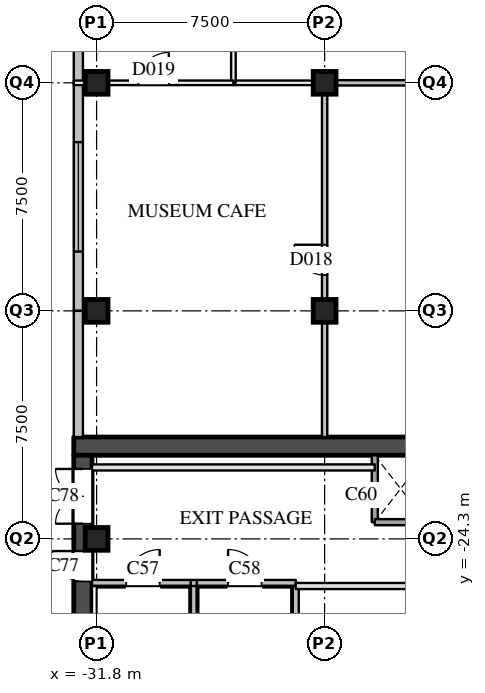
"""IFC4 building model, lengths in metres.
Left out: names, types, materials, properties, quantities, classifications, styles, units other than length and angle.
Written with IfcOpenShell. Run it as: python <this file> out.ifc"""

import sys

from ifc_helpers import new_model, si_unit, direction, frame, frame_2d, origin, origin_2d, place, context, subcontext, project, spatial, rectangle, extrude, element, fill, save


model = new_model("IFC4")
c1 = context("Model", 3, precision=1e-05, world=origin(), true_north=direction((0.0, 1.0)))
c2 = subcontext(c1, "Body", "Model", "MODEL_VIEW")
j1 = project(units=[si_unit("LENGTHUNIT", "METRE"), si_unit("PLANEANGLEUNIT", "RADIAN")], contexts=[c1])
p1 = place(None, origin())
s1 = spatial("IfcSite", under=j1, at=p1, CompositionType="ELEMENT")
p2 = place(p1, origin())
s2 = spatial("IfcBuilding", under=s1, at=p2, CompositionType="ELEMENT")
p3 = place(p2, origin())
s3 = spatial("IfcBuildingStorey", under=s2, at=p3, CompositionType="ELEMENT", Elevation=0.0)
for number, where, z_axis, x_axis in (
    (1, (-31.8, -24.3, 0.0), (0.0, 0.0, 1.0), (1.0, 0.0, 0.0)),
    (2, (-31.8, -16.8, 0.0), (0.0, 0.0, 1.0), (1.0, 0.0, 0.0)),
    (3, (-31.8, -9.3, 0.0), (0.0, 0.0, 1.0), (1.0, 0.0, 0.0)),
    (4, (-24.3, -16.8, 0.0), (0.0, 0.0, 1.0), (1.0, 0.0, 0.0)),
    (5, (-24.3, -9.3, 0.0), (0.0, 0.0, 1.0), (1.0, 0.0, 0.0)),
):
    element("IfcColumn", number, at=place(p3, frame(where, z_axis=z_axis, x_axis=x_axis)), inside=s3, PredefinedType="COLUMN", context=c2, shape_type="SweptSolid", body=[
        extrude(rectangle(XDim=0.75, YDim=0.75, at=origin_2d()), origin(), (0.0, 0.0, 1.0), 8.0),
    ])
p4 = place(p3, frame((-32.4, -1.8, 0.0), z_axis=(0.0, 0.0, 1.0), x_axis=(0.0, -1.0, 0.0)))
e6 = element("IfcWall", 6, at=p4, inside=s3, PredefinedType="SOLIDWALL", context=c2, shape_type="SweptSolid", body=[
    extrude(rectangle(XDim=7.5, YDim=0.3, at=frame_2d((3.75, 0.0))), origin(), (0.0, 0.0, 1.0), 7.59),
])
p5 = place(p4, frame((1.95, 0.0, 0.9)))
e7 = element("IfcOpeningElement", 7, at=p5, cuts=e6, PredefinedType="OPENING", context=c2, shape_type="SweptSolid", body=[
    extrude(rectangle(XDim=3.6, YDim=3.0, at=frame_2d((1.8, 1.5))), frame((0.0, 0.16, 0.0), z_axis=(0.0, -1.0, 0.0), x_axis=(1.0, 0.0, 0.0)), (0.0, 0.0, 1.0), 0.32),
])
p6 = place(p3, frame((-32.4, -9.3, 0.0), z_axis=(0.0, 0.0, 1.0), x_axis=(0.0, -1.0, 0.0)))
e8 = element("IfcWall", 8, at=p6, inside=s3, PredefinedType="SOLIDWALL", context=c2, shape_type="SweptSolid", body=[
    extrude(rectangle(XDim=7.5, YDim=0.3, at=frame_2d((3.75, 0.0))), origin(), (0.0, 0.0, 1.0), 7.59),
])
p7 = place(p6, frame((1.95, 0.0, 0.9)))
e9 = element("IfcOpeningElement", 9, at=p7, cuts=e8, PredefinedType="OPENING", context=c2, shape_type="SweptSolid", body=[
    extrude(rectangle(XDim=3.6, YDim=3.0, at=frame_2d((1.8, 1.5))), frame((0.0, 0.16, 0.0), z_axis=(0.0, -1.0, 0.0), x_axis=(1.0, 0.0, 0.0)), (0.0, 0.0, 1.0), 0.32),
])
p8 = place(p3, frame((-32.4, -16.8, 0.0), z_axis=(0.0, 0.0, 1.0), x_axis=(0.0, -1.0, 0.0)))
e10 = element("IfcWall", 10, at=p8, inside=s3, PredefinedType="SOLIDWALL", context=c2, shape_type="SweptSolid", body=[
    extrude(rectangle(XDim=4.15, YDim=0.3, at=frame_2d((2.075, 0.0))), origin(), (0.0, 0.0, 1.0), 7.59),
])
p9 = place(p3, frame((-32.55, -21.25, 0.0), z_axis=(0.0, 0.0, 1.0), x_axis=(1.0, 0.0, 0.0)))
e11 = element("IfcWall", 11, at=p9, inside=s3, PredefinedType="SHEAR", context=c2, shape_type="SweptSolid", body=[
    extrude(rectangle(XDim=12.2, YDim=0.6, at=frame_2d((6.1, 0.0))), origin(), (0.0, 0.0, 1.0), 7.59),
])
p10 = place(p3, frame((-32.25, -31.95, 0.0), z_axis=(0.0, 0.0, 1.0), x_axis=(0.0, 1.0, 0.0)))
e12 = element("IfcWall", 12, at=p10, inside=s3, PredefinedType="SHEAR", context=c2, shape_type="SweptSolid", body=[
    extrude(rectangle(XDim=10.4, YDim=0.6, at=frame_2d((5.2, 0.0))), origin(), (0.0, 0.0, 1.0), 7.59),
])
p11 = place(p10, frame((6.25, 0.0, 0.0)))
e13 = element("IfcOpeningElement", 13, at=p11, cuts=e12, PredefinedType="OPENING", context=c2, shape_type="SweptSolid", body=[
    extrude(rectangle(XDim=1.0, YDim=2.1, at=frame_2d((0.5, 1.05))), frame((0.0, 0.31, 0.0), z_axis=(0.0, -1.0, 0.0), x_axis=(1.0, 0.0, 0.0)), (0.0, 0.0, 1.0), 0.62),
])
p12 = place(p10, frame((8.15, 0.0, 0.0)))
e14 = element("IfcOpeningElement", 14, at=p12, cuts=e12, PredefinedType="OPENING", context=c2, shape_type="SweptSolid", body=[
    extrude(rectangle(XDim=1.8, YDim=2.4, at=frame_2d((0.9, 1.2))), frame((0.0, 0.31, 0.0), z_axis=(0.0, -1.0, 0.0), x_axis=(1.0, 0.0, 0.0)), (0.0, 0.0, 1.0), 0.62),
])
for number, where, z_axis, x_axis in (
    (15, (-28.6, -27.35, 0.0), (0.0, 0.0, 1.0), (0.0, 1.0, 0.0)),
    (16, (-25.25, -27.35, 0.0), (0.0, 0.0, 1.0), (0.0, 1.0, 0.0)),
):
    element("IfcWall", number, at=place(p3, frame(where, z_axis=z_axis, x_axis=x_axis)), inside=s3, PredefinedType="SOLIDWALL", context=c2, shape_type="SweptSolid", body=[
        extrude(rectangle(XDim=1.6, YDim=0.2, at=frame_2d((0.8, 0.0))), origin(), (0.0, 0.0, 1.0), 7.59),
    ])
p13 = place(p3, frame((-22.65, -23.75, 0.0), z_axis=(0.0, 0.0, 1.0), x_axis=(0.0, 1.0, 0.0)))
e17 = element("IfcWall", 17, at=p13, inside=s3, PredefinedType="SOLIDWALL", context=c2, shape_type="SweptSolid", body=[
    extrude(rectangle(XDim=2.2, YDim=0.2, at=frame_2d((1.1, 0.0))), origin(), (0.0, 0.0, 1.0), 7.59),
])
p14 = place(p13, frame((0.55, 0.0, 0.0)))
e18 = element("IfcOpeningElement", 18, at=p14, cuts=e17, PredefinedType="OPENING", context=c2, shape_type="SweptSolid", body=[
    extrude(rectangle(XDim=0.7, YDim=2.1, at=frame_2d((0.35, 1.05))), frame((0.0, 0.11, 0.0), z_axis=(0.0, -1.0, 0.0), x_axis=(1.0, 0.0, 0.0)), (0.0, 0.0, 1.0), 0.22),
])
p15 = place(p3, frame((-25.25, -25.85, 0.0), z_axis=(0.0, 0.0, 1.0), x_axis=(1.0, 0.0, 0.0)))
e19 = element("IfcWall", 19, at=p15, inside=s3, PredefinedType="PARTITIONING", context=c2, shape_type="SweptSolid", body=[
    extrude(rectangle(XDim=4.3, YDim=0.2, at=frame_2d((2.15, 0.0))), origin(), (0.0, 0.0, 1.0), 7.59),
])
p16 = place(p3, frame((-31.95, -25.75, 0.0), z_axis=(0.0, 0.0, 1.0), x_axis=(1.0, 0.0, 0.0)))
e20 = element("IfcWall", 20, at=p16, inside=s3, PredefinedType="SOLIDWALL", context=c2, shape_type="SweptSolid", body=[
    extrude(rectangle(XDim=3.25, YDim=0.2, at=frame_2d((1.625, 0.0))), origin(), (0.0, 0.0, 1.0), 7.59),
])
p17 = place(p16, frame((1.125, 0.0, 0.0)))
e21 = element("IfcOpeningElement", 21, at=p17, cuts=e20, PredefinedType="OPENING", context=c2, shape_type="SweptSolid", body=[
    extrude(rectangle(XDim=1.1, YDim=2.1, at=frame_2d((0.55, 1.05))), frame((0.0, 0.11, 0.0), z_axis=(0.0, -1.0, 0.0), x_axis=(1.0, 0.0, 0.0)), (0.0, 0.0, 1.0), 0.22),
])
p18 = place(p3, frame((-28.7, -25.75, 0.0), z_axis=(0.0, 0.0, 1.0), x_axis=(1.0, 0.0, 0.0)))
e22 = element("IfcWall", 22, at=p18, inside=s3, PredefinedType="SOLIDWALL", context=c2, shape_type="SweptSolid", body=[
    extrude(rectangle(XDim=0.2, YDim=0.2, at=frame_2d((0.1, 0.0))), origin(), (0.0, 0.0, 1.0), 7.59),
])
p19 = place(p3, frame((-28.5, -25.75, 0.0), z_axis=(0.0, 0.0, 1.0), x_axis=(1.0, 0.0, 0.0)))
e23 = element("IfcWall", 23, at=p19, inside=s3, PredefinedType="SOLIDWALL", context=c2, shape_type="SweptSolid", body=[
    extrude(rectangle(XDim=3.25, YDim=0.2, at=frame_2d((1.625, 0.0))), origin(), (0.0, 0.0, 1.0), 7.59),
])
p20 = place(p19, frame((1.025, 0.0, 0.0)))
e24 = element("IfcOpeningElement", 24, at=p20, cuts=e23, PredefinedType="OPENING", context=c2, shape_type="SweptSolid", body=[
    extrude(rectangle(XDim=1.1, YDim=2.1, at=frame_2d((0.55, 1.05))), frame((0.0, 0.11, 0.0), z_axis=(0.0, -1.0, 0.0), x_axis=(1.0, 0.0, 0.0)), (0.0, 0.0, 1.0), 0.22),
])
p21 = place(p3, frame((-22.65, -23.75, 0.0), z_axis=(0.0, 0.0, 1.0), x_axis=(1.0, 0.0, 0.0)))
e25 = element("IfcWall", 25, at=p21, inside=s3, PredefinedType="SOLIDWALL", context=c2, shape_type="SweptSolid", body=[
    extrude(rectangle(XDim=1.7, YDim=0.2, at=frame_2d((0.85, 0.0))), origin(), (0.0, 0.0, 1.0), 7.59),
])
p22 = place(p3, frame((-31.95, -21.95, 0.0), z_axis=(0.0, 0.0, 1.0), x_axis=(1.0, 0.0, 0.0)))
e26 = element("IfcWall", 26, at=p22, inside=s3, PredefinedType="PARTITIONING", context=c2, shape_type="SweptSolid", body=[
    extrude(rectangle(XDim=9.3, YDim=0.2, at=frame_2d((4.65, 0.0))), origin(), (0.0, 0.0, 1.0), 7.59),
])
p23 = place(p3, frame((-24.3, -9.3, 0.0), z_axis=(0.0, 0.0, 1.0), x_axis=(1.0, 0.0, 0.0)))
e27 = element("IfcWall", 27, at=p23, inside=s3, PredefinedType="PARTITIONING", context=c2, shape_type="SweptSolid", body=[
    extrude(rectangle(XDim=15.0, YDim=0.175, at=frame_2d((7.5, 0.0))), origin(), (0.0, 0.0, 1.0), 6.79),
])
p24 = place(p23, frame((11.1, 0.0, 0.0)))
e28 = element("IfcOpeningElement", 28, at=p24, cuts=e27, PredefinedType="OPENING", context=c2, shape_type="SweptSolid", body=[
    extrude(rectangle(XDim=1.8, YDim=2.1, at=frame_2d((0.9, 1.05))), frame((0.0, 0.097, 0.0), z_axis=(0.0, -1.0, 0.0), x_axis=(1.0, 0.0, 0.0)), (0.0, 0.0, 1.0), 0.195),
])
p25 = place(p3, frame((-24.3, -20.95, 0.0), z_axis=(0.0, 0.0, 1.0), x_axis=(0.0, 1.0, 0.0)))
e29 = element("IfcWall", 29, at=p25, inside=s3, PredefinedType="PARTITIONING", context=c2, shape_type="SweptSolid", body=[
    extrude(rectangle(XDim=11.65, YDim=0.175, at=frame_2d((5.825, 0.0))), origin(), (0.0, 0.0, 1.0), 6.79),
])
p26 = place(p25, frame((5.325, 0.0, 0.0)))
e30 = element("IfcOpeningElement", 30, at=p26, cuts=e29, PredefinedType="OPENING", context=c2, shape_type="SweptSolid", body=[
    extrude(rectangle(XDim=1.0, YDim=2.1, at=frame_2d((0.5, 1.05))), frame((0.0, 0.097, 0.0), z_axis=(0.0, -1.0, 0.0), x_axis=(1.0, 0.0, 0.0)), (0.0, 0.0, 1.0), 0.195),
])
p27 = place(p3, frame((-27.3, -9.3, 0.0), z_axis=(0.0, 0.0, 1.0), x_axis=(1.0, 0.0, 0.0)))
e31 = element("IfcWall", 31, at=p27, inside=s3, PredefinedType="PARTITIONING", context=c2, shape_type="SweptSolid", body=[
    extrude(rectangle(XDim=3.0, YDim=0.15, at=frame_2d((1.5, 0.0))), origin(), (0.0, 0.0, 1.0), 6.79),
])
p28 = place(p3, frame((-27.3, -9.3, 0.0), z_axis=(0.0, 0.0, 1.0), x_axis=(0.0, 1.0, 0.0)))
e32 = element("IfcWall", 32, at=p28, inside=s3, PredefinedType="PARTITIONING", context=c2, shape_type="SweptSolid", body=[
    extrude(rectangle(XDim=21.3, YDim=0.15, at=frame_2d((10.65, 0.0))), origin(), (0.0, 0.0, 1.0), 6.79),
])
p29 = place(p3, frame((-32.55, -9.3, 0.0), z_axis=(0.0, 0.0, 1.0), x_axis=(1.0, 0.0, 0.0)))
e33 = element("IfcWall", 33, at=p29, inside=s3, PredefinedType="PARTITIONING", context=c2, shape_type="SweptSolid", body=[
    extrude(rectangle(XDim=5.25, YDim=0.15, at=frame_2d((2.625, 0.0))), origin(), (0.0, 0.0, 1.0), 6.79),
])
p30 = place(p29, frame((2.125, 0.0, 0.0)))
e34 = element("IfcOpeningElement", 34, at=p30, cuts=e33, PredefinedType="OPENING", context=c2, shape_type="SweptSolid", body=[
    extrude(rectangle(XDim=1.0, YDim=2.1, at=frame_2d((0.5, 1.05))), frame((0.0, 0.085, 0.0), z_axis=(0.0, -1.0, 0.0), x_axis=(1.0, 0.0, 0.0)), (0.0, 0.0, 1.0), 0.17),
])
p31 = place(p7, origin())
e35 = element("IfcWindow", 35, at=p31, inside=s3, PartitioningType="SINGLE_PANEL", PredefinedType="WINDOW", context=c2, shape_type="SweptSolid", body=[
    extrude(rectangle(XDim=3.6, YDim=3.0, at=frame_2d((1.8, 1.5))), frame((0.0, 0.03, 0.0), z_axis=(0.0, -1.0, 0.0), x_axis=(1.0, 0.0, 0.0)), (0.0, 0.0, 1.0), 0.06),
])
fill(e9, e35)
p32 = place(p17, origin())
e36 = element("IfcDoor", 36, at=p32, inside=s3, OperationType="SINGLE_SWING_RIGHT", PredefinedType="DOOR", context=c2, shape_type="SweptSolid", body=[
    extrude(rectangle(XDim=1.1, YDim=2.1, at=frame_2d((0.55, 1.05))), frame((0.0, 0.025, 0.0), z_axis=(0.0, -1.0, 0.0), x_axis=(1.0, 0.0, 0.0)), (0.0, 0.0, 1.0), 0.05),
])
fill(e21, e36)
p33 = place(p20, origin())
e37 = element("IfcDoor", 37, at=p33, inside=s3, OperationType="SINGLE_SWING_LEFT", PredefinedType="DOOR", context=c2, shape_type="SweptSolid", body=[
    extrude(rectangle(XDim=1.1, YDim=2.1, at=frame_2d((0.55, 1.05))), frame((0.0, 0.025, 0.0), z_axis=(0.0, -1.0, 0.0), x_axis=(1.0, 0.0, 0.0)), (0.0, 0.0, 1.0), 0.05),
])
fill(e24, e37)
p34 = place(p14, origin())
e38 = element("IfcDoor", 38, at=p34, inside=s3, OperationType="SINGLE_SWING_LEFT", PredefinedType="DOOR", context=c2, shape_type="SweptSolid", body=[
    extrude(rectangle(XDim=0.7, YDim=2.1, at=frame_2d((0.35, 1.05))), frame((0.0, 0.025, 0.0), z_axis=(0.0, -1.0, 0.0), x_axis=(1.0, 0.0, 0.0)), (0.0, 0.0, 1.0), 0.05),
])
fill(e18, e38)
p35 = place(p11, origin())
e39 = element("IfcDoor", 39, at=p35, inside=s3, OperationType="SINGLE_SWING_RIGHT", PredefinedType="DOOR", context=c2, shape_type="SweptSolid", body=[
    extrude(rectangle(XDim=1.0, YDim=2.1, at=frame_2d((0.5, 1.05))), frame((0.0, 0.025, 0.0), z_axis=(0.0, -1.0, 0.0), x_axis=(1.0, 0.0, 0.0)), (0.0, 0.0, 1.0), 0.05),
])
fill(e13, e39)
p36 = place(p12, origin())
e40 = element("IfcDoor", 40, at=p36, inside=s3, OperationType="DOUBLE_DOOR_SINGLE_SWING", PredefinedType="DOOR", context=c2, shape_type="SweptSolid", body=[
    extrude(rectangle(XDim=1.8, YDim=2.4, at=frame_2d((0.9, 1.2))), frame((0.0, 0.025, 0.0), z_axis=(0.0, -1.0, 0.0), x_axis=(1.0, 0.0, 0.0)), (0.0, 0.0, 1.0), 0.05),
])
fill(e14, e40)
p37 = place(p26, origin())
e41 = element("IfcDoor", 41, at=p37, inside=s3, OperationType="SINGLE_SWING_RIGHT", PredefinedType="DOOR", context=c2, shape_type="SweptSolid", body=[
    extrude(rectangle(XDim=1.0, YDim=2.1, at=frame_2d((0.5, 1.05))), frame((0.0, 0.025, 0.0), z_axis=(0.0, -1.0, 0.0), x_axis=(1.0, 0.0, 0.0)), (0.0, 0.0, 1.0), 0.05),
])
fill(e30, e41)
p38 = place(p30, origin())
e42 = element("IfcDoor", 42, at=p38, inside=s3, OperationType="SINGLE_SWING_RIGHT", PredefinedType="DOOR", context=c2, shape_type="SweptSolid", body=[
    extrude(rectangle(XDim=1.0, YDim=2.1, at=frame_2d((0.5, 1.05))), frame((0.0, 0.025, 0.0), z_axis=(0.0, -1.0, 0.0), x_axis=(1.0, 0.0, 0.0)), (0.0, 0.0, 1.0), 0.05),
])
fill(e34, e42)
save(model, sys.argv[1])
